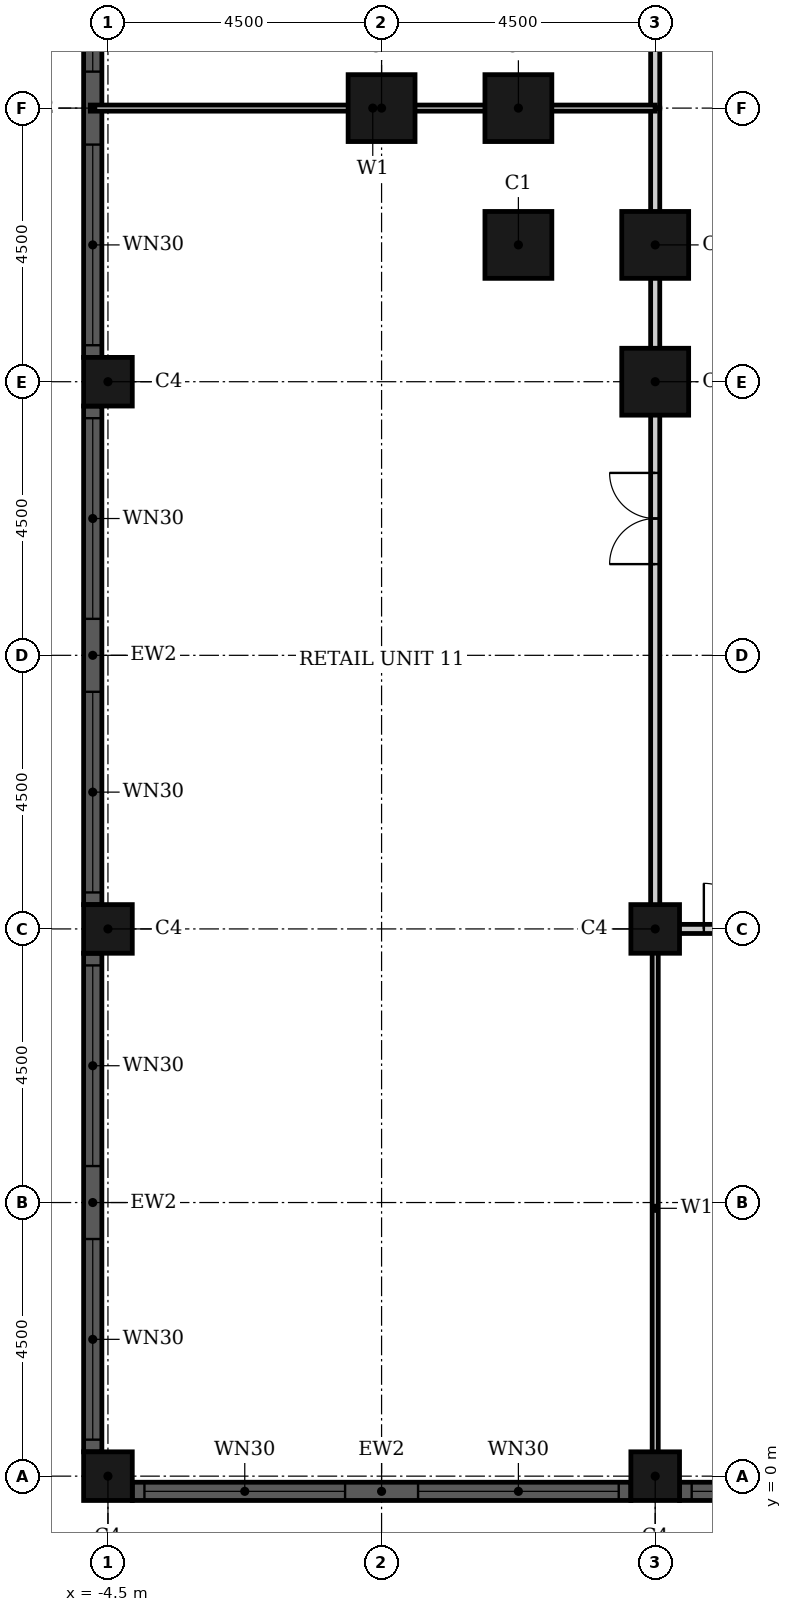
"""IFC4 building model, lengths in metres.
Left out: names, types, materials, properties, quantities, classifications, styles, units other than length and angle.
Written with IfcOpenShell. Run it as: python <this file> out.ifc"""

import sys

from ifc_helpers import new_model, si_unit, direction, frame, frame_2d, origin, origin_2d, place, context, subcontext, project, spatial, rectangle, hollow_rectangle, extrude, element, fill, save


model = new_model("IFC4")
c1 = context("Model", 3, precision=1e-05, world=origin(), true_north=direction((0.0, 1.0)))
c2 = subcontext(c1, "Body", "Model", "MODEL_VIEW")
j1 = project(units=[si_unit("LENGTHUNIT", "METRE"), si_unit("PLANEANGLEUNIT", "RADIAN")], contexts=[c1])
p1 = place(None, origin())
s1 = spatial("IfcSite", under=j1, at=p1, CompositionType="ELEMENT")
p2 = place(p1, origin())
s2 = spatial("IfcBuilding", under=s1, at=p2, CompositionType="ELEMENT")
p3 = place(p2, frame((0.0, 0.0, 6.6)))
s3 = spatial("IfcBuildingStorey", under=s2, at=p3, CompositionType="ELEMENT", Elevation=6.6)
for number, where, z_axis, x_axis in (
    (1, (0.0, 22.5, 0.0), (0.0, 0.0, 1.0), (1.0, 0.0, 0.0)),
    (2, (2.25, 22.5, 0.0), (0.0, 0.0, 1.0), (1.0, 0.0, 0.0)),
    (3, (2.25, 20.25, 0.0), (0.0, 0.0, 1.0), (1.0, 0.0, 0.0)),
    (4, (4.5, 20.25, 0.0), (0.0, 0.0, 1.0), (1.0, 0.0, 0.0)),
    (5, (4.5, 18.0, 0.0), (0.0, 0.0, 1.0), (1.0, 0.0, 0.0)),
):
    element("IfcColumn", number, at=place(p3, frame(where, z_axis=z_axis, x_axis=x_axis)), inside=s3, PredefinedType="COLUMN", context=c2, shape_type="SweptSolid", body=[
        extrude(hollow_rectangle(XDim=1.1, YDim=1.1, WallThickness=0.036, at=origin_2d()), origin(), (0.0, 0.0, 1.0), 5.4),
    ])
for number, where, z_axis, x_axis in (
    (6, (-4.5, 0.0, 0.0), (0.0, 0.0, 1.0), (1.0, 0.0, 0.0)),
    (7, (-4.5, 9.0, 0.0), (0.0, 0.0, 1.0), (1.0, 0.0, 0.0)),
    (8, (-4.5, 18.0, 0.0), (0.0, 0.0, 1.0), (1.0, 0.0, 0.0)),
    (9, (4.5, 0.0, 0.0), (0.0, 0.0, 1.0), (1.0, 0.0, 0.0)),
    (10, (4.5, 9.0, 0.0), (0.0, 0.0, 1.0), (1.0, 0.0, 0.0)),
):
    element("IfcColumn", number, at=place(p3, frame(where, z_axis=z_axis, x_axis=x_axis)), inside=s3, PredefinedType="COLUMN", context=c2, shape_type="SweptSolid", body=[
        extrude(hollow_rectangle(XDim=0.8, YDim=0.8, WallThickness=0.025, at=origin_2d()), origin(), (0.0, 0.0, 1.0), 5.4),
    ])
p4 = place(p3, frame((-4.75, 26.6, 0.0), z_axis=(0.0, 0.0, 1.0), x_axis=(0.0, -1.0, 0.0)))
e11 = element("IfcWall", 11, at=p4, inside=s3, PredefinedType="SOLIDWALL", context=c2, shape_type="SweptSolid", body=[
    extrude(rectangle(XDim=8.2, YDim=0.3, at=frame_2d((4.1, 0.0))), origin(), (0.0, 0.0, 1.0), 5.4),
])
p5 = place(p4, frame((0.2, 0.0, 0.9)))
e12 = element("IfcOpeningElement", 12, at=p5, cuts=e11, PredefinedType="OPENING", context=c2, shape_type="SweptSolid", body=[
    extrude(rectangle(XDim=3.3, YDim=3.5, at=frame_2d((1.65, 1.75))), frame((0.0, 0.16, 0.0), z_axis=(0.0, -1.0, 0.0), x_axis=(1.0, 0.0, 0.0)), (0.0, 0.0, 1.0), 0.32),
])
p6 = place(p4, frame((4.7, 0.0, 0.9)))
e13 = element("IfcOpeningElement", 13, at=p6, cuts=e11, PredefinedType="OPENING", context=c2, shape_type="SweptSolid", body=[
    extrude(rectangle(XDim=3.3, YDim=3.5, at=frame_2d((1.65, 1.75))), frame((0.0, 0.16, 0.0), z_axis=(0.0, -1.0, 0.0), x_axis=(1.0, 0.0, 0.0)), (0.0, 0.0, 1.0), 0.32),
])
p7 = place(p3, frame((-4.75, 17.6, 0.0), z_axis=(0.0, 0.0, 1.0), x_axis=(0.0, -1.0, 0.0)))
e14 = element("IfcWall", 14, at=p7, inside=s3, PredefinedType="SOLIDWALL", context=c2, shape_type="SweptSolid", body=[
    extrude(rectangle(XDim=8.2, YDim=0.3, at=frame_2d((4.1, 0.0))), origin(), (0.0, 0.0, 1.0), 5.4),
])
p8 = place(p7, frame((0.2, 0.0, 0.9)))
e15 = element("IfcOpeningElement", 15, at=p8, cuts=e14, PredefinedType="OPENING", context=c2, shape_type="SweptSolid", body=[
    extrude(rectangle(XDim=3.3, YDim=3.5, at=frame_2d((1.65, 1.75))), frame((0.0, 0.16, 0.0), z_axis=(0.0, -1.0, 0.0), x_axis=(1.0, 0.0, 0.0)), (0.0, 0.0, 1.0), 0.32),
])
p9 = place(p7, frame((4.7, 0.0, 0.9)))
e16 = element("IfcOpeningElement", 16, at=p9, cuts=e14, PredefinedType="OPENING", context=c2, shape_type="SweptSolid", body=[
    extrude(rectangle(XDim=3.3, YDim=3.5, at=frame_2d((1.65, 1.75))), frame((0.0, 0.16, 0.0), z_axis=(0.0, -1.0, 0.0), x_axis=(1.0, 0.0, 0.0)), (0.0, 0.0, 1.0), 0.32),
])
p10 = place(p3, frame((-4.75, 8.6, 0.0), z_axis=(0.0, 0.0, 1.0), x_axis=(0.0, -1.0, 0.0)))
e17 = element("IfcWall", 17, at=p10, inside=s3, PredefinedType="SOLIDWALL", context=c2, shape_type="SweptSolid", body=[
    extrude(rectangle(XDim=8.2, YDim=0.3, at=frame_2d((4.1, 0.0))), origin(), (0.0, 0.0, 1.0), 5.4),
])
p11 = place(p10, frame((0.2, 0.0, 0.9)))
e18 = element("IfcOpeningElement", 18, at=p11, cuts=e17, PredefinedType="OPENING", context=c2, shape_type="SweptSolid", body=[
    extrude(rectangle(XDim=3.3, YDim=3.5, at=frame_2d((1.65, 1.75))), frame((0.0, 0.16, 0.0), z_axis=(0.0, -1.0, 0.0), x_axis=(1.0, 0.0, 0.0)), (0.0, 0.0, 1.0), 0.32),
])
p12 = place(p10, frame((4.7, 0.0, 0.9)))
e19 = element("IfcOpeningElement", 19, at=p12, cuts=e17, PredefinedType="OPENING", context=c2, shape_type="SweptSolid", body=[
    extrude(rectangle(XDim=3.3, YDim=3.5, at=frame_2d((1.65, 1.75))), frame((0.0, 0.16, 0.0), z_axis=(0.0, -1.0, 0.0), x_axis=(1.0, 0.0, 0.0)), (0.0, 0.0, 1.0), 0.32),
])
p13 = place(p3, frame((-4.1, -0.25, 0.0), z_axis=(0.0, 0.0, 1.0), x_axis=(1.0, 0.0, 0.0)))
e20 = element("IfcWall", 20, at=p13, inside=s3, PredefinedType="SOLIDWALL", context=c2, shape_type="SweptSolid", body=[
    extrude(rectangle(XDim=8.2, YDim=0.3, at=frame_2d((4.1, 0.0))), origin(), (0.0, 0.0, 1.0), 5.4),
])
p14 = place(p13, frame((0.2, 0.0, 0.9)))
e21 = element("IfcOpeningElement", 21, at=p14, cuts=e20, PredefinedType="OPENING", context=c2, shape_type="SweptSolid", body=[
    extrude(rectangle(XDim=3.3, YDim=3.5, at=frame_2d((1.65, 1.75))), frame((0.0, 0.16, 0.0), z_axis=(0.0, -1.0, 0.0), x_axis=(1.0, 0.0, 0.0)), (0.0, 0.0, 1.0), 0.32),
])
p15 = place(p13, frame((4.7, 0.0, 0.9)))
e22 = element("IfcOpeningElement", 22, at=p15, cuts=e20, PredefinedType="OPENING", context=c2, shape_type="SweptSolid", body=[
    extrude(rectangle(XDim=3.3, YDim=3.5, at=frame_2d((1.65, 1.75))), frame((0.0, 0.16, 0.0), z_axis=(0.0, -1.0, 0.0), x_axis=(1.0, 0.0, 0.0)), (0.0, 0.0, 1.0), 0.32),
])
p16 = place(p3, frame((4.9, -0.25, 0.0), z_axis=(0.0, 0.0, 1.0), x_axis=(1.0, 0.0, 0.0)))
e23 = element("IfcWall", 23, at=p16, inside=s3, PredefinedType="SOLIDWALL", context=c2, shape_type="SweptSolid", body=[
    extrude(rectangle(XDim=8.2, YDim=0.3, at=frame_2d((4.1, 0.0))), origin(), (0.0, 0.0, 1.0), 5.4),
])
p17 = place(p16, frame((0.2, 0.0, 0.9)))
e24 = element("IfcOpeningElement", 24, at=p17, cuts=e23, PredefinedType="OPENING", context=c2, shape_type="SweptSolid", body=[
    extrude(rectangle(XDim=3.3, YDim=3.5, at=frame_2d((1.65, 1.75))), frame((0.0, 0.16, 0.0), z_axis=(0.0, -1.0, 0.0), x_axis=(1.0, 0.0, 0.0)), (0.0, 0.0, 1.0), 0.32),
])
p18 = place(p16, frame((4.7, 0.0, 0.9)))
e25 = element("IfcOpeningElement", 25, at=p18, cuts=e23, PredefinedType="OPENING", context=c2, shape_type="SweptSolid", body=[
    extrude(rectangle(XDim=3.3, YDim=3.5, at=frame_2d((1.65, 1.75))), frame((0.0, 0.16, 0.0), z_axis=(0.0, -1.0, 0.0), x_axis=(1.0, 0.0, 0.0)), (0.0, 0.0, 1.0), 0.32),
])
p19 = place(p3, frame((4.5, 9.0, 0.0), z_axis=(0.0, 0.0, 1.0), x_axis=(1.0, 0.0, 0.0)))
e26 = element("IfcWall", 26, at=p19, inside=s3, PredefinedType="PARTITIONING", context=c2, shape_type="SweptSolid", body=[
    extrude(rectangle(XDim=3.1, YDim=0.15, at=frame_2d((1.55, 0.0))), origin(), (0.0, 0.0, 1.0), 5.05),
])
p20 = place(p19, frame((0.8, 0.0, 0.0)))
e27 = element("IfcOpeningElement", 27, at=p20, cuts=e26, PredefinedType="OPENING", context=c2, shape_type="SweptSolid", body=[
    extrude(rectangle(XDim=1.5, YDim=2.4, at=frame_2d((0.75, 1.2))), frame((0.0, 0.085, 0.0), z_axis=(0.0, -1.0, 0.0), x_axis=(1.0, 0.0, 0.0)), (0.0, 0.0, 1.0), 0.17),
])
p21 = place(p3, frame((4.5, 9.0, 0.0), z_axis=(0.0, 0.0, 1.0), x_axis=(0.0, 1.0, 0.0)))
e28 = element("IfcWall", 28, at=p21, inside=s3, PredefinedType="PARTITIONING", context=c2, shape_type="SweptSolid", body=[
    extrude(rectangle(XDim=13.5, YDim=0.15, at=frame_2d((6.75, 0.0))), origin(), (0.0, 0.0, 1.0), 5.05),
])
p22 = place(p21, frame((6.0, 0.0, 0.0)))
e29 = element("IfcOpeningElement", 29, at=p22, cuts=e28, PredefinedType="OPENING", context=c2, shape_type="SweptSolid", body=[
    extrude(rectangle(XDim=1.5, YDim=2.4, at=frame_2d((0.75, 1.2))), frame((0.0, 0.085, 0.0), z_axis=(0.0, -1.0, 0.0), x_axis=(1.0, 0.0, 0.0)), (0.0, 0.0, 1.0), 0.17),
])
p23 = place(p3, frame((4.5, 22.5, 0.0), z_axis=(0.0, 0.0, 1.0), x_axis=(0.0, 1.0, 0.0)))
e30 = element("IfcWall", 30, at=p23, inside=s3, PredefinedType="PARTITIONING", context=c2, shape_type="SweptSolid", body=[
    extrude(rectangle(XDim=7.0, YDim=0.15, at=frame_2d((3.5, 0.0))), origin(), (0.0, 0.0, 1.0), 5.05),
])
p24 = place(p23, frame((2.3, 0.0, 0.0)))
e31 = element("IfcOpeningElement", 31, at=p24, cuts=e30, PredefinedType="OPENING", context=c2, shape_type="SweptSolid", body=[
    extrude(rectangle(XDim=1.5, YDim=2.4, at=frame_2d((0.75, 1.2))), frame((0.0, 0.085, 0.0), z_axis=(0.0, -1.0, 0.0), x_axis=(1.0, 0.0, 0.0)), (0.0, 0.0, 1.0), 0.17),
])
p25 = place(p3, frame((-4.79, 22.5, 0.0), z_axis=(0.0, 0.0, 1.0), x_axis=(1.0, 0.0, 0.0)))
e32 = element("IfcWall", 32, at=p25, inside=s3, PredefinedType="PARTITIONING", context=c2, shape_type="SweptSolid", body=[
    extrude(rectangle(XDim=9.29, YDim=0.1, at=frame_2d((4.645, 0.0))), origin(), (0.0, 0.0, 1.0), 5.05),
])
p26 = place(p3, frame((4.5, -0.19, 0.0), z_axis=(0.0, 0.0, 1.0), x_axis=(0.0, 1.0, 0.0)))
e33 = element("IfcWall", 33, at=p26, inside=s3, PredefinedType="PARTITIONING", context=c2, shape_type="SweptSolid", body=[
    extrude(rectangle(XDim=9.19, YDim=0.1, at=frame_2d((4.595, 0.0))), origin(), (0.0, 0.0, 1.0), 5.05),
])
p27 = place(p5, origin())
e34 = element("IfcWindow", 34, at=p27, inside=s3, PartitioningType="SINGLE_PANEL", PredefinedType="WINDOW", context=c2, shape_type="SweptSolid", body=[
    extrude(rectangle(XDim=3.3, YDim=3.5, at=frame_2d((1.65, 1.75))), frame((0.0, 0.03, 0.0), z_axis=(0.0, -1.0, 0.0), x_axis=(1.0, 0.0, 0.0)), (0.0, 0.0, 1.0), 0.06),
])
fill(e12, e34)
p28 = place(p6, origin())
e35 = element("IfcWindow", 35, at=p28, inside=s3, PartitioningType="SINGLE_PANEL", PredefinedType="WINDOW", context=c2, shape_type="SweptSolid", body=[
    extrude(rectangle(XDim=3.3, YDim=3.5, at=frame_2d((1.65, 1.75))), frame((0.0, 0.03, 0.0), z_axis=(0.0, -1.0, 0.0), x_axis=(1.0, 0.0, 0.0)), (0.0, 0.0, 1.0), 0.06),
])
fill(e13, e35)
p29 = place(p8, origin())
e36 = element("IfcWindow", 36, at=p29, inside=s3, PartitioningType="SINGLE_PANEL", PredefinedType="WINDOW", context=c2, shape_type="SweptSolid", body=[
    extrude(rectangle(XDim=3.3, YDim=3.5, at=frame_2d((1.65, 1.75))), frame((0.0, 0.03, 0.0), z_axis=(0.0, -1.0, 0.0), x_axis=(1.0, 0.0, 0.0)), (0.0, 0.0, 1.0), 0.06),
])
fill(e15, e36)
p30 = place(p9, origin())
e37 = element("IfcWindow", 37, at=p30, inside=s3, PartitioningType="SINGLE_PANEL", PredefinedType="WINDOW", context=c2, shape_type="SweptSolid", body=[
    extrude(rectangle(XDim=3.3, YDim=3.5, at=frame_2d((1.65, 1.75))), frame((0.0, 0.03, 0.0), z_axis=(0.0, -1.0, 0.0), x_axis=(1.0, 0.0, 0.0)), (0.0, 0.0, 1.0), 0.06),
])
fill(e16, e37)
p31 = place(p11, origin())
e38 = element("IfcWindow", 38, at=p31, inside=s3, PartitioningType="SINGLE_PANEL", PredefinedType="WINDOW", context=c2, shape_type="SweptSolid", body=[
    extrude(rectangle(XDim=3.3, YDim=3.5, at=frame_2d((1.65, 1.75))), frame((0.0, 0.03, 0.0), z_axis=(0.0, -1.0, 0.0), x_axis=(1.0, 0.0, 0.0)), (0.0, 0.0, 1.0), 0.06),
])
fill(e18, e38)
p32 = place(p12, origin())
e39 = element("IfcWindow", 39, at=p32, inside=s3, PartitioningType="SINGLE_PANEL", PredefinedType="WINDOW", context=c2, shape_type="SweptSolid", body=[
    extrude(rectangle(XDim=3.3, YDim=3.5, at=frame_2d((1.65, 1.75))), frame((0.0, 0.03, 0.0), z_axis=(0.0, -1.0, 0.0), x_axis=(1.0, 0.0, 0.0)), (0.0, 0.0, 1.0), 0.06),
])
fill(e19, e39)
p33 = place(p14, origin())
e40 = element("IfcWindow", 40, at=p33, inside=s3, PartitioningType="SINGLE_PANEL", PredefinedType="WINDOW", context=c2, shape_type="SweptSolid", body=[
    extrude(rectangle(XDim=3.3, YDim=3.5, at=frame_2d((1.65, 1.75))), frame((0.0, 0.03, 0.0), z_axis=(0.0, -1.0, 0.0), x_axis=(1.0, 0.0, 0.0)), (0.0, 0.0, 1.0), 0.06),
])
fill(e21, e40)
p34 = place(p15, origin())
e41 = element("IfcWindow", 41, at=p34, inside=s3, PartitioningType="SINGLE_PANEL", PredefinedType="WINDOW", context=c2, shape_type="SweptSolid", body=[
    extrude(rectangle(XDim=3.3, YDim=3.5, at=frame_2d((1.65, 1.75))), frame((0.0, 0.03, 0.0), z_axis=(0.0, -1.0, 0.0), x_axis=(1.0, 0.0, 0.0)), (0.0, 0.0, 1.0), 0.06),
])
fill(e22, e41)
p35 = place(p17, origin())
e42 = element("IfcWindow", 42, at=p35, inside=s3, PartitioningType="SINGLE_PANEL", PredefinedType="WINDOW", context=c2, shape_type="SweptSolid", body=[
    extrude(rectangle(XDim=3.3, YDim=3.5, at=frame_2d((1.65, 1.75))), frame((0.0, 0.03, 0.0), z_axis=(0.0, -1.0, 0.0), x_axis=(1.0, 0.0, 0.0)), (0.0, 0.0, 1.0), 0.06),
])
fill(e24, e42)
p36 = place(p22, origin())
e43 = element("IfcDoor", 43, at=p36, inside=s3, OperationType="DOUBLE_DOOR_SINGLE_SWING", PredefinedType="DOOR", context=c2, shape_type="SweptSolid", body=[
    extrude(rectangle(XDim=1.5, YDim=2.4, at=frame_2d((0.75, 1.2))), frame((0.0, 0.025, 0.0), z_axis=(0.0, -1.0, 0.0), x_axis=(1.0, 0.0, 0.0)), (0.0, 0.0, 1.0), 0.05),
])
fill(e29, e43)
p37 = place(p20, origin())
e44 = element("IfcDoor", 44, at=p37, inside=s3, OperationType="DOUBLE_DOOR_SINGLE_SWING", PredefinedType="DOOR", context=c2, shape_type="SweptSolid", body=[
    extrude(rectangle(XDim=1.5, YDim=2.4, at=frame_2d((0.75, 1.2))), frame((0.0, 0.025, 0.0), z_axis=(0.0, -1.0, 0.0), x_axis=(1.0, 0.0, 0.0)), (0.0, 0.0, 1.0), 0.05),
])
fill(e27, e44)
save(model, sys.argv[1])
